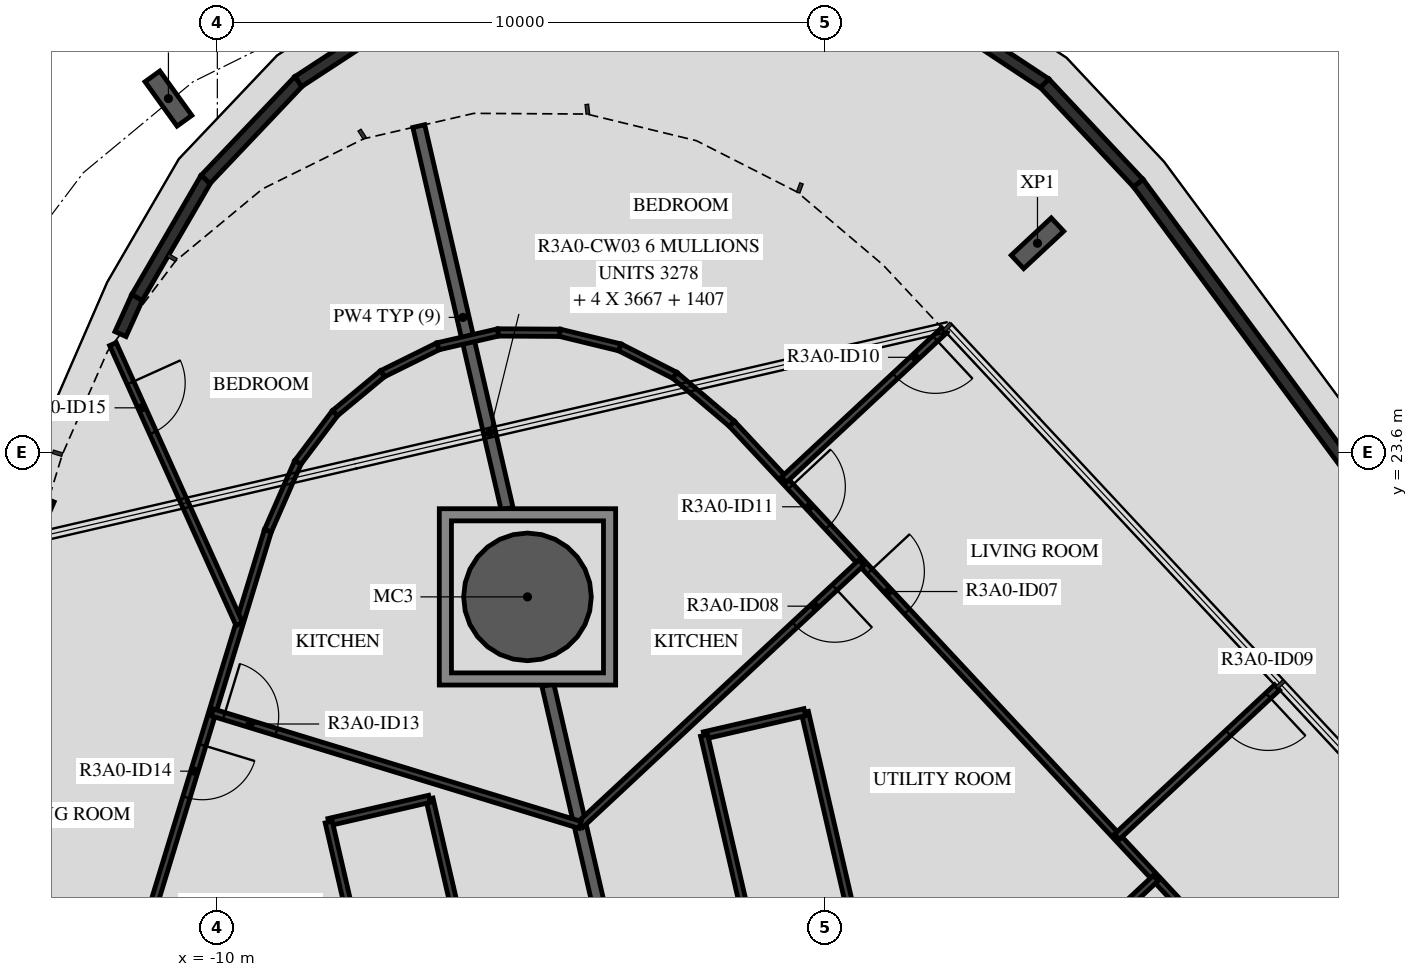
"""IFC4 building model, lengths in metres.
Left out: names, types, materials, properties, quantities, classifications, styles, units other than length and angle.
Written with IfcOpenShell. Run it as: python <this file> out.ifc"""

import sys

from ifc_helpers import new_model, si_unit, direction, frame, frame_2d, origin, origin_2d, place, context, subcontext, project, spatial, polyline, rectangle, hollow_circle, i_section, outline, extrude, element, fill, save


model = new_model("IFC4")
c1 = context("Model", 3, precision=1e-05, world=origin(), true_north=direction((0.0, 1.0)))
c2 = subcontext(c1, "Body", "Model", "MODEL_VIEW")
j1 = project(units=[si_unit("LENGTHUNIT", "METRE"), si_unit("PLANEANGLEUNIT", "RADIAN")], contexts=[c1])
p1 = place(None, origin())
s1 = spatial("IfcSite", under=j1, at=p1, CompositionType="ELEMENT")
p2 = place(p1, origin())
s2 = spatial("IfcBuilding", under=s1, at=p2, CompositionType="ELEMENT")
p3 = place(p2, frame((0.0, 0.0, 113.4)))
s3 = spatial("IfcBuildingStorey", under=s2, at=p3, CompositionType="ELEMENT", Elevation=113.4)
p4 = place(p3, frame((-4.9, 21.223, -0.45), z_axis=(0.0, 0.0, 1.0), x_axis=(1.0, 0.0, 0.0)))
e1 = element("IfcColumn", 1, at=p4, inside=s3, PredefinedType="COLUMN", context=c2, shape_type="SweptSolid", body=[
    extrude(hollow_circle(Radius=1.05, WallThickness=0.05, at=origin_2d()), origin(), (0.0, 0.0, 1.0), 3.57),
])
for number, where, z_axis, x_axis in (
    (2, (3.487, 27.039, -0.45), (0.0, 0.0, 1.0), (0.682, -0.731, 0.0)),
    (3, (-10.804, 29.418, -0.45), (0.0, 0.0, 1.0), (0.811, 0.585, 0.0)),
):
    element("IfcColumn", number, at=place(p3, frame(where, z_axis=z_axis, x_axis=x_axis)), inside=s3, PredefinedType="COLUMN", context=c2, shape_type="SweptSolid", body=[
        extrude(i_section(OverallWidth=0.3, OverallDepth=0.9, WebThickness=0.019, FlangeThickness=0.035, FilletRadius=0.03, at=origin_2d()), origin(), (0.0, 0.0, 1.0), 3.57),
    ])
p5 = place(p3, frame((-26.845, -9.558, 0.03), z_axis=(0.0, 0.0, 1.0), x_axis=(0.398491196924, 0.917172157217, 0.0)))
e4 = element("IfcWall", 4, at=p5, inside=s3, PredefinedType="PARAPET", context=c2, shape_type="SweptSolid", body=[
    extrude(rectangle(XDim=35.306, YDim=0.2, at=frame_2d((17.653, 0.0))), origin(), (0.0, 0.0, 1.0), 1.5),
])
p6 = place(p3, frame((-11.593, 25.545, 0.03), z_axis=(0.0, 0.0, 1.0), x_axis=(0.412088088401, 0.911144010241, 0.0)))
e5 = element("IfcWall", 5, at=p6, inside=s3, PredefinedType="PARAPET", context=c2, shape_type="SweptSolid", body=[
    extrude(rectangle(XDim=0.665, YDim=0.2, at=frame_2d((0.333, 0.0))), origin(), (0.0, 0.0, 1.0), 1.5),
])
p7 = place(p3, frame((-11.321, 26.147, 0.03), z_axis=(0.0, 0.0, 1.0), x_axis=(0.502532095663, 0.864558553731, 0.0)))
e6 = element("IfcWall", 6, at=p7, inside=s3, PredefinedType="PARAPET", context=c2, shape_type="SweptSolid", body=[
    extrude(rectangle(XDim=2.257, YDim=0.2, at=frame_2d((1.128, 0.0))), origin(), (0.0, 0.0, 1.0), 1.5),
])
for number, where, z_axis, x_axis in (
    (7, (-10.194, 28.089, 0.03), (0.0, 0.0, 1.0), (0.688, 0.725, 0.0)),
    (8, (-8.669, 29.698, 0.03), (0.0, 0.0, 1.0), (0.837, 0.547, 0.0)),
):
    element("IfcWall", number, at=place(p3, frame(where, z_axis=z_axis, x_axis=x_axis)), inside=s3, PredefinedType="PARAPET", context=c2, shape_type="SweptSolid", body=[
        extrude(rectangle(XDim=2.228, YDim=0.2, at=frame_2d((1.114, 0.0))), origin(), (0.0, 0.0, 1.0), 1.5),
    ])
p8 = place(p3, frame((1.756, 30.892, 0.03), z_axis=(0.0, 0.0, 1.0), x_axis=(0.833883256051, -0.55194086212, 0.0)))
e9 = element("IfcWall", 9, at=p8, inside=s3, PredefinedType="PARAPET", context=c2, shape_type="SweptSolid", body=[
    extrude(rectangle(XDim=2.228, YDim=0.2, at=frame_2d((1.114, 0.0))), origin(), (0.0, 0.0, 1.0), 1.5),
])
p9 = place(p3, frame((3.605, 29.669, 0.03), z_axis=(0.0, 0.0, 1.0), x_axis=(0.684142558873, -0.729348311261, 0.0)))
e10 = element("IfcWall", 10, at=p9, inside=s3, PredefinedType="PARAPET", context=c2, shape_type="SweptSolid", body=[
    extrude(rectangle(XDim=2.258, YDim=0.2, at=frame_2d((1.129, 0.0))), origin(), (0.0, 0.0, 1.0), 1.5),
])
p10 = place(p3, frame((5.146, 28.027, 0.03), z_axis=(0.0, 0.0, 1.0), x_axis=(0.595048436217, -0.803689839774, 0.0)))
e11 = element("IfcWall", 11, at=p10, inside=s3, PredefinedType="PARAPET", context=c2, shape_type="SweptSolid", body=[
    extrude(rectangle(XDim=35.306, YDim=0.2, at=frame_2d((17.653, 0.0))), origin(), (0.0, 0.0, 1.0), 1.5),
])
p11 = place(p3, frame((-4.565, 19.773, 0.0), z_axis=(0.0, 0.0, 1.0), x_axis=(0.224940633072, -0.974372470667, 0.0)))
e12 = element("IfcWall", 12, at=p11, inside=s3, PredefinedType="STANDARD", context=c2, shape_type="SweptSolid", body=[
    extrude(rectangle(XDim=6.594, YDim=0.2, at=frame_2d((3.297, 0.0))), origin(), (0.0, 0.0, 1.0), 3.12),
])
p12 = place(p3, frame((-6.687, 28.966, 0.0), z_axis=(0.0, 0.0, 1.0), x_axis=(0.224945100086, -0.974371439415, 0.0)))
e13 = element("IfcWall", 13, at=p12, inside=s3, PredefinedType="STANDARD", context=c2, shape_type="SweptSolid", body=[
    extrude(rectangle(XDim=6.458, YDim=0.2, at=frame_2d((3.229, 0.0))), origin(), (0.0, 0.0, 1.0), 3.12),
])
p13 = place(p3, frame((0.496, 15.714, 0.0), z_axis=(0.0, 0.0, 1.0), x_axis=(-0.224960478174, 0.974367889075, 0.0)))
e14 = element("IfcWall", 14, at=p13, inside=s3, PredefinedType="PARTITIONING", context=c2, shape_type="SweptSolid", body=[
    extrude(rectangle(XDim=3.708, YDim=0.12, at=frame_2d((1.854, 0.0))), origin(), (0.0, 0.0, 1.0), 3.12),
])
p14 = place(p3, frame((-0.338, 19.328, 0.0), z_axis=(0.0, 0.0, 1.0), x_axis=(-0.974383934081, -0.224890971374, 0.0)))
e15 = element("IfcWall", 15, at=p14, inside=s3, PredefinedType="PARTITIONING", context=c2, shape_type="SweptSolid", body=[
    extrude(rectangle(XDim=1.7, YDim=0.12, at=frame_2d((0.85, 0.0))), origin(), (0.0, 0.0, 1.0), 3.12),
])
p15 = place(p3, frame((-1.995, 18.945, 0.0), z_axis=(0.0, 0.0, 1.0), x_axis=(0.224946048274, -0.974371220514, 0.0)))
e16 = element("IfcWall", 16, at=p15, inside=s3, PredefinedType="PARTITIONING", context=c2, shape_type="SweptSolid", body=[
    extrude(rectangle(XDim=3.708, YDim=0.12, at=frame_2d((1.854, 0.0))), origin(), (0.0, 0.0, 1.0), 3.12),
])
p16 = place(p3, frame((-1.539, 24.071, 0.0), z_axis=(0.0, 0.0, 1.0), x_axis=(0.68200220595, -0.731350115252, 0.0)))
e17 = element("IfcWall", 17, at=p16, inside=s3, PredefinedType="PARTITIONING", context=c2, shape_type="SweptSolid", body=[
    extrude(rectangle(XDim=17.316, YDim=0.12, at=frame_2d((8.658, 0.0))), origin(), (0.0, 0.0, 1.0), 3.12),
])
p17 = place(p16, frame((3.323, 0.0, 0.0)))
e18 = element("IfcOpeningElement", 18, at=p17, cuts=e17, PredefinedType="OPENING", context=c2, shape_type="SweptSolid", body=[
    extrude(rectangle(XDim=0.9, YDim=2.1, at=frame_2d((0.45, 1.05))), frame((0.0, 0.07, 0.0), z_axis=(0.0, -1.0, 0.0), x_axis=(1.0, 0.0, 0.0)), (0.0, 0.0, 1.0), 0.14),
])
p18 = place(p16, frame((1.417, 0.0, 0.0)))
e19 = element("IfcOpeningElement", 19, at=p18, cuts=e17, PredefinedType="OPENING", context=c2, shape_type="SweptSolid", body=[
    extrude(rectangle(XDim=0.9, YDim=2.1, at=frame_2d((0.45, 1.05))), frame((0.0, 0.07, 0.0), z_axis=(0.0, -1.0, 0.0), x_axis=(1.0, 0.0, 0.0)), (0.0, 0.0, 1.0), 0.14),
])
p19 = place(p3, frame((7.427, 19.734, 0.0), z_axis=(0.0, 0.0, 1.0), x_axis=(-0.73139345201, -0.681955730497, 0.0)))
e20 = element("IfcWall", 20, at=p19, inside=s3, PredefinedType="PARTITIONING", context=c2, shape_type="SweptSolid", body=[
    extrude(rectangle(XDim=3.6, YDim=0.12, at=frame_2d((1.8, 0.0))), origin(), (0.0, 0.0, 1.0), 2.73),
])
p20 = place(p19, frame((0.2, 0.0, 0.0)))
e21 = element("IfcOpeningElement", 21, at=p20, cuts=e20, PredefinedType="OPENING", context=c2, shape_type="SweptSolid", body=[
    extrude(rectangle(XDim=0.9, YDim=2.1, at=frame_2d((0.45, 1.05))), frame((0.0, 0.07, 0.0), z_axis=(0.0, -1.0, 0.0), x_axis=(1.0, 0.0, 0.0)), (0.0, 0.0, 1.0), 0.14),
])
p21 = place(p3, frame((5.431, 16.597, 0.0), z_axis=(0.0, 0.0, 1.0), x_axis=(-0.731378807316, -0.681971436505, 0.0)))
e22 = element("IfcWall", 22, at=p21, inside=s3, PredefinedType="PARTITIONING", context=c2, shape_type="SweptSolid", body=[
    extrude(rectangle(XDim=2.609, YDim=0.12, at=frame_2d((1.305, 0.0))), origin(), (0.0, 0.0, 1.0), 3.12),
])
p22 = place(p3, frame((1.951, 25.607, 0.0), z_axis=(0.0, 0.0, 1.0), x_axis=(-0.731328084739, -0.682025829769, 0.0)))
e23 = element("IfcWall", 23, at=p22, inside=s3, PredefinedType="PARTITIONING", context=c2, shape_type="SweptSolid", body=[
    extrude(rectangle(XDim=3.6, YDim=0.12, at=frame_2d((1.8, 0.0))), origin(), (0.0, 0.0, 1.0), 2.73),
])
p23 = place(p22, frame((0.2, 0.0, 0.0)))
e24 = element("IfcOpeningElement", 24, at=p23, cuts=e23, PredefinedType="OPENING", context=c2, shape_type="SweptSolid", body=[
    extrude(rectangle(XDim=0.9, YDim=2.1, at=frame_2d((0.45, 1.05))), frame((0.0, 0.07, 0.0), z_axis=(0.0, -1.0, 0.0), x_axis=(1.0, 0.0, 0.0)), (0.0, 0.0, 1.0), 0.14),
])
p24 = place(p3, frame((0.591, 21.787, 0.0), z_axis=(0.0, 0.0, 1.0), x_axis=(-0.731363296574, -0.681988070588, 0.0)))
e25 = element("IfcWall", 25, at=p24, inside=s3, PredefinedType="PARTITIONING", context=c2, shape_type="SweptSolid", body=[
    extrude(rectangle(XDim=6.324, YDim=0.12, at=frame_2d((3.162, 0.0))), origin(), (0.0, 0.0, 1.0), 3.12),
])
p25 = place(p24, frame((0.6, 0.0, 0.0)))
e26 = element("IfcOpeningElement", 26, at=p25, cuts=e25, PredefinedType="OPENING", context=c2, shape_type="SweptSolid", body=[
    extrude(rectangle(XDim=0.9, YDim=2.1, at=frame_2d((0.45, 1.05))), frame((0.0, 0.07, 0.0), z_axis=(0.0, -1.0, 0.0), x_axis=(1.0, 0.0, 0.0)), (0.0, 0.0, 1.0), 0.14),
])
for number, where, z_axis, x_axis in (
    (27, (-6.372, 25.344, 0.0), (0.0, 0.0, 1.0), (0.974, 0.225, 0.0)),
    (28, (-5.383, 25.572, 0.0), (0.0, 0.0, 1.0), (1.0, -0.006, 0.0)),
):
    element("IfcWall", number, at=place(p3, frame(where, z_axis=z_axis, x_axis=x_axis)), inside=s3, PredefinedType="PARTITIONING", context=c2, shape_type="SweptSolid", body=[
        extrude(rectangle(XDim=1.016, YDim=0.12, at=frame_2d((0.508, 0.0))), origin(), (0.0, 0.0, 1.0), 3.12),
    ])
p26 = place(p3, frame((-4.367, 25.566, 0.0), z_axis=(0.0, 0.0, 1.0), x_axis=(0.971704876381, -0.236198292157, 0.0)))
e29 = element("IfcWall", 29, at=p26, inside=s3, PredefinedType="PARTITIONING", context=c2, shape_type="SweptSolid", body=[
    extrude(rectangle(XDim=1.016, YDim=0.12, at=frame_2d((0.508, 0.0))), origin(), (0.0, 0.0, 1.0), 3.12),
])
p27 = place(p3, frame((-3.379, 25.326, 0.0), z_axis=(0.0, 0.0, 1.0), x_axis=(0.890890892221, -0.454217368842, 0.0)))
e30 = element("IfcWall", 30, at=p27, inside=s3, PredefinedType="PARTITIONING", context=c2, shape_type="SweptSolid", body=[
    extrude(rectangle(XDim=1.016, YDim=0.12, at=frame_2d((0.508, 0.0))), origin(), (0.0, 0.0, 1.0), 3.12),
])
p28 = place(p3, frame((-2.474, 24.865, 0.0), z_axis=(0.0, 0.0, 1.0), x_axis=(0.762351487461, -0.647163201647, 0.0)))
e31 = element("IfcWall", 31, at=p28, inside=s3, PredefinedType="PARTITIONING", context=c2, shape_type="SweptSolid", body=[
    extrude(rectangle(XDim=1.227, YDim=0.12, at=frame_2d((0.614, 0.0))), origin(), (0.0, 0.0, 1.0), 3.12),
])
p29 = place(p3, frame((-5.677, 14.289, 0.0), z_axis=(0.0, 0.0, 1.0), x_axis=(-0.224960478174, 0.974367889075, 0.0)))
e32 = element("IfcWall", 32, at=p29, inside=s3, PredefinedType="PARTITIONING", context=c2, shape_type="SweptSolid", body=[
    extrude(rectangle(XDim=3.708, YDim=0.12, at=frame_2d((1.854, 0.0))), origin(), (0.0, 0.0, 1.0), 3.12),
])
p30 = place(p3, frame((-6.512, 17.902, 0.0), z_axis=(0.0, 0.0, 1.0), x_axis=(-0.974376669418, -0.224922444621, 0.0)))
e33 = element("IfcWall", 33, at=p30, inside=s3, PredefinedType="PARTITIONING", context=c2, shape_type="SweptSolid", body=[
    extrude(rectangle(XDim=1.7, YDim=0.12, at=frame_2d((0.85, 0.0))), origin(), (0.0, 0.0, 1.0), 3.12),
])
p31 = place(p3, frame((-8.168, 17.52, 0.0), z_axis=(0.0, 0.0, 1.0), x_axis=(0.224960478174, -0.974367889075, 0.0)))
e34 = element("IfcWall", 34, at=p31, inside=s3, PredefinedType="PARTITIONING", context=c2, shape_type="SweptSolid", body=[
    extrude(rectangle(XDim=3.708, YDim=0.12, at=frame_2d((1.854, 0.0))), origin(), (0.0, 0.0, 1.0), 3.12),
])
p32 = place(p3, frame((-6.372, 25.344, 0.0), z_axis=(0.0, 0.0, 1.0), x_axis=(-0.896341374877, -0.443364567466, 0.0)))
e35 = element("IfcWall", 35, at=p32, inside=s3, PredefinedType="PARTITIONING", context=c2, shape_type="SweptSolid", body=[
    extrude(rectangle(XDim=1.016, YDim=0.12, at=frame_2d((0.508, 0.0))), origin(), (0.0, 0.0, 1.0), 3.12),
])
p33 = place(p3, frame((-7.283, 24.893, 0.0), z_axis=(0.0, 0.0, 1.0), x_axis=(-0.769657158348, -0.638457405473, 0.0)))
e36 = element("IfcWall", 36, at=p33, inside=s3, PredefinedType="PARTITIONING", context=c2, shape_type="SweptSolid", body=[
    extrude(rectangle(XDim=1.016, YDim=0.12, at=frame_2d((0.508, 0.0))), origin(), (0.0, 0.0, 1.0), 3.12),
])
p34 = place(p3, frame((-8.065, 24.245, 0.0), z_axis=(0.0, 0.0, 1.0), x_axis=(-0.601959070304, -0.798526942363, 0.0)))
e37 = element("IfcWall", 37, at=p34, inside=s3, PredefinedType="PARTITIONING", context=c2, shape_type="SweptSolid", body=[
    extrude(rectangle(XDim=1.016, YDim=0.12, at=frame_2d((0.508, 0.0))), origin(), (0.0, 0.0, 1.0), 3.12),
])
p35 = place(p3, frame((-8.677, 23.433, 0.0), z_axis=(0.0, 0.0, 1.0), x_axis=(-0.401351130635, -0.915924270853, 0.0)))
e38 = element("IfcWall", 38, at=p35, inside=s3, PredefinedType="PARTITIONING", context=c2, shape_type="SweptSolid", body=[
    extrude(rectangle(XDim=1.227, YDim=0.12, at=frame_2d((0.614, 0.0))), origin(), (0.0, 0.0, 1.0), 3.12),
])
p36 = place(p3, frame((-9.169, 22.31, 0.0), z_axis=(0.0, 0.0, 1.0), x_axis=(-0.29236145486, -0.956307889601, 0.0)))
e39 = element("IfcWall", 39, at=p36, inside=s3, PredefinedType="PARTITIONING", context=c2, shape_type="SweptSolid", body=[
    extrude(rectangle(XDim=17.316, YDim=0.12, at=frame_2d((8.658, 0.0))), origin(), (0.0, 0.0, 1.0), 3.12),
])
p37 = place(p36, frame((3.683, 0.0, 0.0)))
e40 = element("IfcOpeningElement", 40, at=p37, cuts=e39, PredefinedType="OPENING", context=c2, shape_type="SweptSolid", body=[
    extrude(rectangle(XDim=0.9, YDim=2.1, at=frame_2d((0.45, 1.05))), frame((0.0, 0.07, 0.0), z_axis=(0.0, -1.0, 0.0), x_axis=(1.0, 0.0, 0.0)), (0.0, 0.0, 1.0), 0.14),
])
p38 = place(p3, frame((-10.082, 19.323, 0.0), z_axis=(0.0, 0.0, 1.0), x_axis=(0.956300011431, -0.292387222936, 0.0)))
e41 = element("IfcWall", 41, at=p38, inside=s3, PredefinedType="PARTITIONING", context=c2, shape_type="SweptSolid", body=[
    extrude(rectangle(XDim=6.324, YDim=0.12, at=frame_2d((3.162, 0.0))), origin(), (0.0, 0.0, 1.0), 3.12),
])
p39 = place(p38, frame((0.2, 0.0, 0.0)))
e42 = element("IfcOpeningElement", 42, at=p39, cuts=e41, PredefinedType="OPENING", context=c2, shape_type="SweptSolid", body=[
    extrude(rectangle(XDim=0.9, YDim=2.1, at=frame_2d((0.45, 1.05))), frame((0.0, 0.07, 0.0), z_axis=(0.0, -1.0, 0.0), x_axis=(1.0, 0.0, 0.0)), (0.0, 0.0, 1.0), 0.14),
])
p40 = place(p3, frame((-11.717, 25.381, 0.0), z_axis=(0.0, 0.0, 1.0), x_axis=(0.411493504767, -0.911412692217, 0.0)))
e43 = element("IfcWall", 43, at=p40, inside=s3, PredefinedType="PARTITIONING", context=c2, shape_type="SweptSolid", body=[
    extrude(rectangle(XDim=5.052, YDim=0.12, at=frame_2d((2.526, 0.0))), origin(), (0.0, 0.0, 1.0), 3.12),
])
p41 = place(p40, frame((0.7, 0.0, 0.0)))
e44 = element("IfcOpeningElement", 44, at=p41, cuts=e43, PredefinedType="OPENING", context=c2, shape_type="SweptSolid", body=[
    extrude(rectangle(XDim=0.9, YDim=2.1, at=frame_2d((0.45, 1.05))), frame((0.0, 0.07, 0.0), z_axis=(0.0, -1.0, 0.0), x_axis=(1.0, 0.0, 0.0)), (0.0, 0.0, 1.0), 0.14),
])
p42 = place(p3, origin())
e45 = element("IfcWall", 45, at=p42, inside=s3, PredefinedType="STANDARD", context=c2, shape_type="SweptSolid", body=[
    extrude(outline(polyline([(-3.45, 22.674), (-3.45, 19.773), (-6.35, 19.773), (-6.35, 22.674), (-3.45, 22.674)]), holes=[polyline([(-6.15, 19.973), (-3.65, 19.973), (-3.65, 22.473), (-6.15, 22.473), (-6.15, 19.973)])]), origin(), (0.0, 0.0, 1.0), 3.12),
])
p43 = place(p17, origin())
e46 = element("IfcDoor", 46, at=p43, inside=s3, OperationType="SINGLE_SWING_RIGHT", PredefinedType="DOOR", context=c2, shape_type="SweptSolid", body=[
    extrude(rectangle(XDim=0.9, YDim=2.1, at=frame_2d((0.45, 1.05))), frame((0.0, 0.025, 0.0), z_axis=(0.0, -1.0, 0.0), x_axis=(1.0, 0.0, 0.0)), (0.0, 0.0, 1.0), 0.05),
])
fill(e18, e46)
p44 = place(p25, origin())
e47 = element("IfcDoor", 47, at=p44, inside=s3, OperationType="SINGLE_SWING_RIGHT", PredefinedType="DOOR", context=c2, shape_type="SweptSolid", body=[
    extrude(rectangle(XDim=0.9, YDim=2.1, at=frame_2d((0.45, 1.05))), frame((0.0, 0.025, 0.0), z_axis=(0.0, -1.0, 0.0), x_axis=(1.0, 0.0, 0.0)), (0.0, 0.0, 1.0), 0.05),
])
fill(e26, e47)
p45 = place(p20, origin())
e48 = element("IfcDoor", 48, at=p45, inside=s3, OperationType="SINGLE_SWING_LEFT", PredefinedType="DOOR", context=c2, shape_type="SweptSolid", body=[
    extrude(rectangle(XDim=0.9, YDim=2.1, at=frame_2d((0.45, 1.05))), frame((0.0, 0.025, 0.0), z_axis=(0.0, -1.0, 0.0), x_axis=(1.0, 0.0, 0.0)), (0.0, 0.0, 1.0), 0.05),
])
fill(e21, e48)
p46 = place(p23, origin())
e49 = element("IfcDoor", 49, at=p46, inside=s3, OperationType="SINGLE_SWING_RIGHT", PredefinedType="DOOR", context=c2, shape_type="SweptSolid", body=[
    extrude(rectangle(XDim=0.9, YDim=2.1, at=frame_2d((0.45, 1.05))), frame((0.0, 0.025, 0.0), z_axis=(0.0, -1.0, 0.0), x_axis=(1.0, 0.0, 0.0)), (0.0, 0.0, 1.0), 0.05),
])
fill(e24, e49)
p47 = place(p18, origin())
e50 = element("IfcDoor", 50, at=p47, inside=s3, OperationType="SINGLE_SWING_LEFT", PredefinedType="DOOR", context=c2, shape_type="SweptSolid", body=[
    extrude(rectangle(XDim=0.9, YDim=2.1, at=frame_2d((0.45, 1.05))), frame((0.0, 0.025, 0.0), z_axis=(0.0, -1.0, 0.0), x_axis=(1.0, 0.0, 0.0)), (0.0, 0.0, 1.0), 0.05),
])
fill(e19, e50)
p48 = place(p39, origin())
e51 = element("IfcDoor", 51, at=p48, inside=s3, OperationType="SINGLE_SWING_LEFT", PredefinedType="DOOR", context=c2, shape_type="SweptSolid", body=[
    extrude(rectangle(XDim=0.9, YDim=2.1, at=frame_2d((0.45, 1.05))), frame((0.0, 0.025, 0.0), z_axis=(0.0, -1.0, 0.0), x_axis=(1.0, 0.0, 0.0)), (0.0, 0.0, 1.0), 0.05),
])
fill(e42, e51)
p49 = place(p37, origin())
e52 = element("IfcDoor", 52, at=p49, inside=s3, OperationType="SINGLE_SWING_LEFT", PredefinedType="DOOR", context=c2, shape_type="SweptSolid", body=[
    extrude(rectangle(XDim=0.9, YDim=2.1, at=frame_2d((0.45, 1.05))), frame((0.0, 0.025, 0.0), z_axis=(0.0, -1.0, 0.0), x_axis=(1.0, 0.0, 0.0)), (0.0, 0.0, 1.0), 0.05),
])
fill(e40, e52)
p50 = place(p41, origin())
e53 = element("IfcDoor", 53, at=p50, inside=s3, OperationType="SINGLE_SWING_LEFT", PredefinedType="DOOR", context=c2, shape_type="SweptSolid", body=[
    extrude(rectangle(XDim=0.9, YDim=2.1, at=frame_2d((0.45, 1.05))), frame((0.0, 0.025, 0.0), z_axis=(0.0, -1.0, 0.0), x_axis=(1.0, 0.0, 0.0)), (0.0, 0.0, 1.0), 0.05),
])
fill(e44, e53)
save(model, sys.argv[1])
